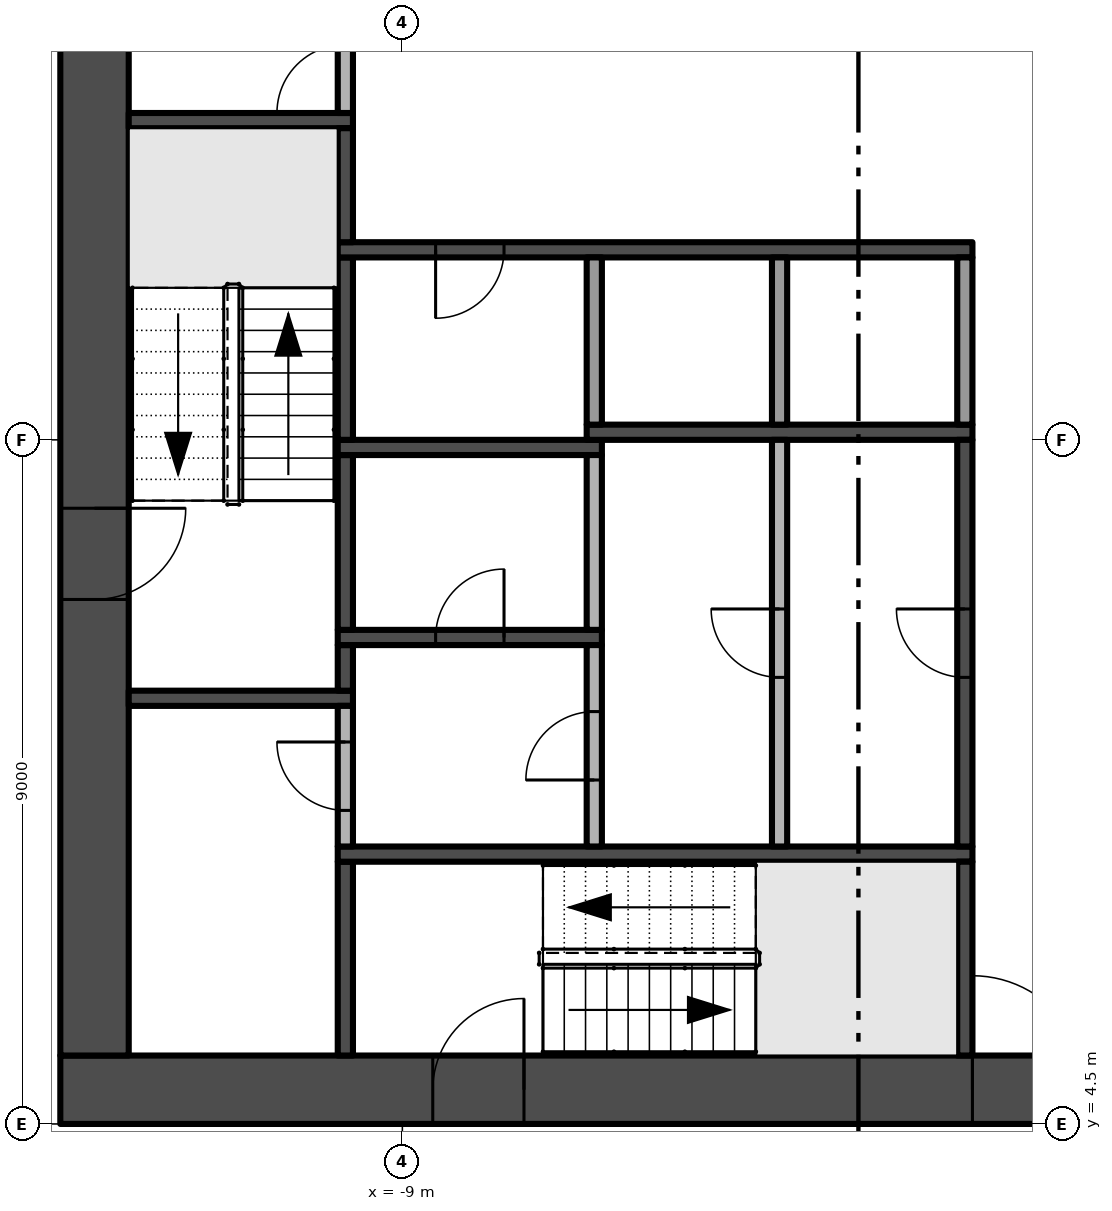
"""IFC4 building model, lengths in metres.
Left out: names, types, materials, properties, quantities, classifications, styles, units other than length and angle.
Written with IfcOpenShell. Run it as: python <this file> out.ifc"""

import sys

from ifc_helpers import new_model, si_unit, direction, frame, frame_2d, origin, place, context, subcontext, project, spatial, rectangle, extrude, element, fill, save


model = new_model("IFC4")
c1 = context("Model", 3, precision=1e-05, world=origin(), true_north=direction((0.0, 1.0)))
c2 = subcontext(c1, "Body", "Model", "MODEL_VIEW")
j1 = project(units=[si_unit("LENGTHUNIT", "METRE"), si_unit("PLANEANGLEUNIT", "RADIAN")], contexts=[c1])
p1 = place(None, origin())
s1 = spatial("IfcSite", under=j1, at=p1, CompositionType="ELEMENT")
p2 = place(p1, origin())
s2 = spatial("IfcBuilding", under=s1, at=p2, CompositionType="ELEMENT")
p3 = place(p2, frame((0.0, 0.0, 37.8)))
s3 = spatial("IfcBuildingStorey", under=s2, at=p3, CompositionType="ELEMENT", Elevation=37.8)
p4 = place(p3, frame((-13.5, 4.95, -0.3), z_axis=(0.0, 0.0, 1.0), x_axis=(1.0, 0.0, 0.0)))
e1 = element("IfcWall", 1, at=p4, inside=s3, PredefinedType="SHEAR", context=c2, shape_type="SweptSolid", body=[
    extrude(rectangle(XDim=27.0, YDim=0.9, at=frame_2d((13.5, 0.0))), origin(), (0.0, 0.0, 1.0), 3.8),
])
p5 = place(p4, frame((12.0, 0.0, 0.3)))
e2 = element("IfcOpeningElement", 2, at=p5, cuts=e1, PredefinedType="OPENING", context=c2, shape_type="SweptSolid", body=[
    extrude(rectangle(XDim=3.0, YDim=2.4, at=frame_2d((1.5, 1.2))), frame((0.0, 0.46, 0.0), z_axis=(0.0, -1.0, 0.0), x_axis=(1.0, 0.0, 0.0)), (0.0, 0.0, 1.0), 0.92),
])
p6 = place(p4, frame((4.9, 0.0, 0.3)))
e3 = element("IfcOpeningElement", 3, at=p6, cuts=e1, PredefinedType="OPENING", context=c2, shape_type="SweptSolid", body=[
    extrude(rectangle(XDim=1.2, YDim=2.2, at=frame_2d((0.6, 1.1))), frame((0.0, 0.46, 0.0), z_axis=(0.0, -1.0, 0.0), x_axis=(1.0, 0.0, 0.0)), (0.0, 0.0, 1.0), 0.92),
])
p7 = place(p4, frame((20.75, 0.0, 0.3)))
e4 = element("IfcOpeningElement", 4, at=p7, cuts=e1, PredefinedType="OPENING", context=c2, shape_type="SweptSolid", body=[
    extrude(rectangle(XDim=1.5, YDim=2.2, at=frame_2d((0.75, 1.1))), frame((0.0, 0.46, 0.0), z_axis=(0.0, -1.0, 0.0), x_axis=(1.0, 0.0, 0.0)), (0.0, 0.0, 1.0), 0.92),
])
p8 = place(p4, frame((17.4, 0.0, 0.3)))
e5 = element("IfcOpeningElement", 5, at=p8, cuts=e1, PredefinedType="OPENING", context=c2, shape_type="SweptSolid", body=[
    extrude(rectangle(XDim=1.2, YDim=2.2, at=frame_2d((0.6, 1.1))), frame((0.0, 0.46, 0.0), z_axis=(0.0, -1.0, 0.0), x_axis=(1.0, 0.0, 0.0)), (0.0, 0.0, 1.0), 0.92),
])
p9 = place(p3, frame((-13.05, 21.6, -0.3), z_axis=(0.0, 0.0, 1.0), x_axis=(0.0, -1.0, 0.0)))
e6 = element("IfcWall", 6, at=p9, inside=s3, PredefinedType="SHEAR", context=c2, shape_type="SweptSolid", body=[
    extrude(rectangle(XDim=16.2, YDim=0.9, at=frame_2d((8.1, 0.0))), origin(), (0.0, 0.0, 1.0), 3.8),
])
p10 = place(p9, frame((9.0, 0.0, 0.3)))
e7 = element("IfcOpeningElement", 7, at=p10, cuts=e6, PredefinedType="OPENING", context=c2, shape_type="SweptSolid", body=[
    extrude(rectangle(XDim=1.2, YDim=2.2, at=frame_2d((0.6, 1.1))), frame((0.0, 0.46, 0.0), z_axis=(0.0, -1.0, 0.0), x_axis=(1.0, 0.0, 0.0)), (0.0, 0.0, 1.0), 0.92),
])
for number, where, z_axis, x_axis in (
    (8, (-12.6, 10.1, 0.0), (0.0, 0.0, 1.0), (1.0, 0.0, 0.0)),
    (9, (-12.6, 17.7, 0.0), (0.0, 0.0, 1.0), (1.0, 0.0, 0.0)),
):
    element("IfcWall", number, at=place(p3, frame(where, z_axis=z_axis, x_axis=x_axis)), inside=s3, PredefinedType="SHEAR", context=c2, shape_type="SweptSolid", body=[
        extrude(rectangle(XDim=2.95, YDim=0.2, at=frame_2d((1.475, 0.0))), origin(), (0.0, 0.0, 1.0), 3.5),
    ])
p11 = place(p3, frame((-9.75, 5.4, 0.0), z_axis=(0.0, 0.0, 1.0), x_axis=(0.0, 1.0, 0.0)))
e10 = element("IfcWall", 10, at=p11, inside=s3, PredefinedType="SHEAR", context=c2, shape_type="SweptSolid", body=[
    extrude(rectangle(XDim=2.55, YDim=0.2, at=frame_2d((1.275, 0.0))), origin(), (0.0, 0.0, 1.0), 3.5),
])
p12 = place(p3, frame((-9.85, 8.05, 0.0), z_axis=(0.0, 0.0, 1.0), x_axis=(1.0, 0.0, 0.0)))
e11 = element("IfcWall", 11, at=p12, inside=s3, PredefinedType="SHEAR", context=c2, shape_type="SweptSolid", body=[
    extrude(rectangle(XDim=8.35, YDim=0.2, at=frame_2d((4.175, 0.0))), origin(), (0.0, 0.0, 1.0), 3.5),
])
p13 = place(p3, frame((-9.75, 8.15, 0.0), z_axis=(0.0, 0.0, 1.0), x_axis=(0.0, 1.0, 0.0)))
e12 = element("IfcWall", 12, at=p13, inside=s3, PredefinedType="PARTITIONING", context=c2, shape_type="SweptSolid", body=[
    extrude(rectangle(XDim=1.85, YDim=0.2, at=frame_2d((0.925, 0.0))), origin(), (0.0, 0.0, 1.0), 3.5),
])
p14 = place(p13, frame((0.475, 0.0, 0.0)))
e13 = element("IfcOpeningElement", 13, at=p14, cuts=e12, PredefinedType="OPENING", context=c2, shape_type="SweptSolid", body=[
    extrude(rectangle(XDim=0.9, YDim=2.1, at=frame_2d((0.45, 1.05))), frame((0.0, 0.11, 0.0), z_axis=(0.0, -1.0, 0.0), x_axis=(1.0, 0.0, 0.0)), (0.0, 0.0, 1.0), 0.22),
])
p15 = place(p3, frame((-9.75, 10.2, 0.0), z_axis=(0.0, 0.0, 1.0), x_axis=(0.0, 1.0, 0.0)))
e14 = element("IfcWall", 14, at=p15, inside=s3, PredefinedType="SHEAR", context=c2, shape_type="SweptSolid", body=[
    extrude(rectangle(XDim=0.6, YDim=0.2, at=frame_2d((0.3, 0.0))), origin(), (0.0, 0.0, 1.0), 3.5),
])
p16 = place(p3, frame((-9.85, 10.9, 0.0), z_axis=(0.0, 0.0, 1.0), x_axis=(1.0, 0.0, 0.0)))
e15 = element("IfcWall", 15, at=p16, inside=s3, PredefinedType="SHEAR", context=c2, shape_type="SweptSolid", body=[
    extrude(rectangle(XDim=3.475, YDim=0.2, at=frame_2d((1.738, 0.0))), origin(), (0.0, 0.0, 1.0), 3.5),
])
p17 = place(p16, frame((1.288, 0.0, 0.0)))
e16 = element("IfcOpeningElement", 16, at=p17, cuts=e15, PredefinedType="OPENING", context=c2, shape_type="SweptSolid", body=[
    extrude(rectangle(XDim=0.9, YDim=2.1, at=frame_2d((0.45, 1.05))), frame((0.0, 0.11, 0.0), z_axis=(0.0, -1.0, 0.0), x_axis=(1.0, 0.0, 0.0)), (0.0, 0.0, 1.0), 0.22),
])
p18 = place(p3, frame((-9.75, 11.0, 0.0), z_axis=(0.0, 0.0, 1.0), x_axis=(0.0, 1.0, 0.0)))
e17 = element("IfcWall", 17, at=p18, inside=s3, PredefinedType="SHEAR", context=c2, shape_type="SweptSolid", body=[
    extrude(rectangle(XDim=2.3, YDim=0.2, at=frame_2d((1.15, 0.0))), origin(), (0.0, 0.0, 1.0), 3.5),
])
p19 = place(p3, frame((-9.85, 13.4, 0.0), z_axis=(0.0, 0.0, 1.0), x_axis=(1.0, 0.0, 0.0)))
e18 = element("IfcWall", 18, at=p19, inside=s3, PredefinedType="SHEAR", context=c2, shape_type="SweptSolid", body=[
    extrude(rectangle(XDim=3.475, YDim=0.2, at=frame_2d((1.738, 0.0))), origin(), (0.0, 0.0, 1.0), 3.5),
])
p20 = place(p3, frame((-9.75, 13.5, 0.0), z_axis=(0.0, 0.0, 1.0), x_axis=(0.0, 1.0, 0.0)))
e19 = element("IfcWall", 19, at=p20, inside=s3, PredefinedType="SHEAR", context=c2, shape_type="SweptSolid", body=[
    extrude(rectangle(XDim=2.4, YDim=0.2, at=frame_2d((1.2, 0.0))), origin(), (0.0, 0.0, 1.0), 3.5),
])
p21 = place(p3, frame((-1.5, 16.0, 0.0), z_axis=(0.0, 0.0, 1.0), x_axis=(-1.0, 0.0, 0.0)))
e20 = element("IfcWall", 20, at=p21, inside=s3, PredefinedType="SHEAR", context=c2, shape_type="SweptSolid", body=[
    extrude(rectangle(XDim=8.35, YDim=0.2, at=frame_2d((4.175, 0.0))), origin(), (0.0, 0.0, 1.0), 3.5),
])
p22 = place(p21, frame((6.162, 0.0, 0.0)))
e21 = element("IfcOpeningElement", 21, at=p22, cuts=e20, PredefinedType="OPENING", context=c2, shape_type="SweptSolid", body=[
    extrude(rectangle(XDim=0.9, YDim=2.1, at=frame_2d((0.45, 1.05))), frame((0.0, 0.11, 0.0), z_axis=(0.0, -1.0, 0.0), x_axis=(1.0, 0.0, 0.0)), (0.0, 0.0, 1.0), 0.22),
])
p23 = place(p3, frame((-9.75, 16.1, 0.0), z_axis=(0.0, 0.0, 1.0), x_axis=(0.0, 1.0, 0.0)))
e22 = element("IfcWall", 22, at=p23, inside=s3, PredefinedType="SHEAR", context=c2, shape_type="SweptSolid", body=[
    extrude(rectangle(XDim=1.5, YDim=0.2, at=frame_2d((0.75, 0.0))), origin(), (0.0, 0.0, 1.0), 3.5),
])
p24 = place(p3, frame((-9.75, 17.8, 0.0), z_axis=(0.0, 0.0, 1.0), x_axis=(0.0, 1.0, 0.0)))
e23 = element("IfcWall", 23, at=p24, inside=s3, PredefinedType="PARTITIONING", context=c2, shape_type="SweptSolid", body=[
    extrude(rectangle(XDim=1.4, YDim=0.2, at=frame_2d((0.7, 0.0))), origin(), (0.0, 0.0, 1.0), 3.5),
])
p25 = place(p24, origin())
e24 = element("IfcOpeningElement", 24, at=p25, cuts=e23, PredefinedType="OPENING", context=c2, shape_type="SweptSolid", body=[
    extrude(rectangle(XDim=0.9, YDim=2.1, at=frame_2d((0.45, 1.05))), frame((0.0, 0.11, 0.0), z_axis=(0.0, -1.0, 0.0), x_axis=(1.0, 0.0, 0.0)), (0.0, 0.0, 1.0), 0.22),
])
p26 = place(p3, frame((-6.475, 8.15, 0.0), z_axis=(0.0, 0.0, 1.0), x_axis=(0.0, 1.0, 0.0)))
e25 = element("IfcWall", 25, at=p26, inside=s3, PredefinedType="PARTITIONING", context=c2, shape_type="SweptSolid", body=[
    extrude(rectangle(XDim=2.65, YDim=0.2, at=frame_2d((1.325, 0.0))), origin(), (0.0, 0.0, 1.0), 3.5),
])
p27 = place(p26, frame((0.875, 0.0, 0.0)))
e26 = element("IfcOpeningElement", 26, at=p27, cuts=e25, PredefinedType="OPENING", context=c2, shape_type="SweptSolid", body=[
    extrude(rectangle(XDim=0.9, YDim=2.1, at=frame_2d((0.45, 1.05))), frame((0.0, 0.11, 0.0), z_axis=(0.0, -1.0, 0.0), x_axis=(1.0, 0.0, 0.0)), (0.0, 0.0, 1.0), 0.22),
])
p28 = place(p3, frame((-6.475, 11.0, 0.0), z_axis=(0.0, 0.0, 1.0), x_axis=(0.0, 1.0, 0.0)))
e27 = element("IfcWall", 27, at=p28, inside=s3, PredefinedType="PARTITIONING", context=c2, shape_type="SweptSolid", body=[
    extrude(rectangle(XDim=2.3, YDim=0.2, at=frame_2d((1.15, 0.0))), origin(), (0.0, 0.0, 1.0), 3.5),
])
p29 = place(p3, frame((-6.575, 13.6, 0.0), z_axis=(0.0, 0.0, 1.0), x_axis=(1.0, 0.0, 0.0)))
e28 = element("IfcWall", 28, at=p29, inside=s3, PredefinedType="SHEAR", context=c2, shape_type="SweptSolid", body=[
    extrude(rectangle(XDim=5.075, YDim=0.2, at=frame_2d((2.538, 0.0))), origin(), (0.0, 0.0, 1.0), 3.5),
])
p30 = place(p3, frame((-6.475, 13.7, 0.0), z_axis=(0.0, 0.0, 1.0), x_axis=(0.0, 1.0, 0.0)))
e29 = element("IfcWall", 29, at=p30, inside=s3, PredefinedType="PARTITIONING", context=c2, shape_type="SweptSolid", body=[
    extrude(rectangle(XDim=2.2, YDim=0.2, at=frame_2d((1.1, 0.0))), origin(), (0.0, 0.0, 1.0), 3.5),
])
p31 = place(p3, frame((-4.037, 8.15, 0.0), z_axis=(0.0, 0.0, 1.0), x_axis=(0.0, 1.0, 0.0)))
e30 = element("IfcWall", 30, at=p31, inside=s3, PredefinedType="PARTITIONING", context=c2, shape_type="SweptSolid", body=[
    extrude(rectangle(XDim=5.35, YDim=0.2, at=frame_2d((2.675, 0.0))), origin(), (0.0, 0.0, 1.0), 3.5),
])
p32 = place(p31, frame((2.225, 0.0, 0.0)))
e31 = element("IfcOpeningElement", 31, at=p32, cuts=e30, PredefinedType="OPENING", context=c2, shape_type="SweptSolid", body=[
    extrude(rectangle(XDim=0.9, YDim=2.1, at=frame_2d((0.45, 1.05))), frame((0.0, 0.11, 0.0), z_axis=(0.0, -1.0, 0.0), x_axis=(1.0, 0.0, 0.0)), (0.0, 0.0, 1.0), 0.22),
])
p33 = place(p3, frame((-4.037, 13.7, 0.0), z_axis=(0.0, 0.0, 1.0), x_axis=(0.0, 1.0, 0.0)))
e32 = element("IfcWall", 32, at=p33, inside=s3, PredefinedType="PARTITIONING", context=c2, shape_type="SweptSolid", body=[
    extrude(rectangle(XDim=2.2, YDim=0.2, at=frame_2d((1.1, 0.0))), origin(), (0.0, 0.0, 1.0), 3.5),
])
p34 = place(p3, frame((-1.6, 5.4, 0.0), z_axis=(0.0, 0.0, 1.0), x_axis=(0.0, 1.0, 0.0)))
e33 = element("IfcWall", 33, at=p34, inside=s3, PredefinedType="SHEAR", context=c2, shape_type="SweptSolid", body=[
    extrude(rectangle(XDim=2.55, YDim=0.2, at=frame_2d((1.275, 0.0))), origin(), (0.0, 0.0, 1.0), 3.5),
])
p35 = place(p3, frame((-1.6, 8.15, 0.0), z_axis=(0.0, 0.0, 1.0), x_axis=(0.0, 1.0, 0.0)))
e34 = element("IfcWall", 34, at=p35, inside=s3, PredefinedType="SHEAR", context=c2, shape_type="SweptSolid", body=[
    extrude(rectangle(XDim=5.35, YDim=0.2, at=frame_2d((2.675, 0.0))), origin(), (0.0, 0.0, 1.0), 3.5),
])
p36 = place(p35, frame((2.225, 0.0, 0.0)))
e35 = element("IfcOpeningElement", 35, at=p36, cuts=e34, PredefinedType="OPENING", context=c2, shape_type="SweptSolid", body=[
    extrude(rectangle(XDim=0.9, YDim=2.1, at=frame_2d((0.45, 1.05))), frame((0.0, 0.11, 0.0), z_axis=(0.0, -1.0, 0.0), x_axis=(1.0, 0.0, 0.0)), (0.0, 0.0, 1.0), 0.22),
])
p37 = place(p3, frame((-1.6, 13.7, 0.0), z_axis=(0.0, 0.0, 1.0), x_axis=(0.0, 1.0, 0.0)))
e36 = element("IfcWall", 36, at=p37, inside=s3, PredefinedType="PARTITIONING", context=c2, shape_type="SweptSolid", body=[
    extrude(rectangle(XDim=2.2, YDim=0.2, at=frame_2d((1.1, 0.0))), origin(), (0.0, 0.0, 1.0), 3.5),
])
p38 = place(p5, frame((3.0, 0.0, 0.0), z_axis=(0.0, 0.0, 1.0), x_axis=(-1.0, 0.0, 0.0)))
e37 = element("IfcDoor", 37, at=p38, inside=s3, OperationType="DOUBLE_DOOR_SINGLE_SWING", PredefinedType="DOOR", context=c2, shape_type="SweptSolid", body=[
    extrude(rectangle(XDim=3.0, YDim=2.4, at=frame_2d((1.5, 1.2))), frame((0.0, 0.025, 0.0), z_axis=(0.0, -1.0, 0.0), x_axis=(1.0, 0.0, 0.0)), (0.0, 0.0, 1.0), 0.05),
])
fill(e2, e37)
p39 = place(p10, frame((1.2, 0.0, 0.0), z_axis=(0.0, 0.0, 1.0), x_axis=(-1.0, 0.0, 0.0)))
e38 = element("IfcDoor", 38, at=p39, inside=s3, OperationType="SINGLE_SWING_RIGHT", PredefinedType="DOOR", context=c2, shape_type="SweptSolid", body=[
    extrude(rectangle(XDim=1.2, YDim=2.2, at=frame_2d((0.6, 1.1))), frame((0.0, 0.025, 0.0), z_axis=(0.0, -1.0, 0.0), x_axis=(1.0, 0.0, 0.0)), (0.0, 0.0, 1.0), 0.05),
])
fill(e7, e38)
p40 = place(p6, frame((1.2, 0.0, 0.0), z_axis=(0.0, 0.0, 1.0), x_axis=(-1.0, 0.0, 0.0)))
e39 = element("IfcDoor", 39, at=p40, inside=s3, OperationType="SINGLE_SWING_LEFT", PredefinedType="DOOR", context=c2, shape_type="SweptSolid", body=[
    extrude(rectangle(XDim=1.2, YDim=2.2, at=frame_2d((0.6, 1.1))), frame((0.0, 0.025, 0.0), z_axis=(0.0, -1.0, 0.0), x_axis=(1.0, 0.0, 0.0)), (0.0, 0.0, 1.0), 0.05),
])
fill(e3, e39)
p41 = place(p22, origin())
e40 = element("IfcDoor", 40, at=p41, inside=s3, OperationType="SINGLE_SWING_RIGHT", PredefinedType="DOOR", context=c2, shape_type="SweptSolid", body=[
    extrude(rectangle(XDim=0.9, YDim=2.1, at=frame_2d((0.45, 1.05))), frame((0.0, 0.025, 0.0), z_axis=(0.0, -1.0, 0.0), x_axis=(1.0, 0.0, 0.0)), (0.0, 0.0, 1.0), 0.05),
])
fill(e21, e40)
p42 = place(p36, origin())
e41 = element("IfcDoor", 41, at=p42, inside=s3, OperationType="SINGLE_SWING_RIGHT", PredefinedType="DOOR", context=c2, shape_type="SweptSolid", body=[
    extrude(rectangle(XDim=0.9, YDim=2.1, at=frame_2d((0.45, 1.05))), frame((0.0, 0.025, 0.0), z_axis=(0.0, -1.0, 0.0), x_axis=(1.0, 0.0, 0.0)), (0.0, 0.0, 1.0), 0.05),
])
fill(e35, e41)
p43 = place(p25, origin())
e42 = element("IfcDoor", 42, at=p43, inside=s3, OperationType="SINGLE_SWING_LEFT", PredefinedType="DOOR", context=c2, shape_type="SweptSolid", body=[
    extrude(rectangle(XDim=0.9, YDim=2.1, at=frame_2d((0.45, 1.05))), frame((0.0, 0.025, 0.0), z_axis=(0.0, -1.0, 0.0), x_axis=(1.0, 0.0, 0.0)), (0.0, 0.0, 1.0), 0.05),
])
fill(e24, e42)
p44 = place(p32, origin())
e43 = element("IfcDoor", 43, at=p44, inside=s3, OperationType="SINGLE_SWING_RIGHT", PredefinedType="DOOR", context=c2, shape_type="SweptSolid", body=[
    extrude(rectangle(XDim=0.9, YDim=2.1, at=frame_2d((0.45, 1.05))), frame((0.0, 0.025, 0.0), z_axis=(0.0, -1.0, 0.0), x_axis=(1.0, 0.0, 0.0)), (0.0, 0.0, 1.0), 0.05),
])
fill(e31, e43)
p45 = place(p27, origin())
e44 = element("IfcDoor", 44, at=p45, inside=s3, OperationType="SINGLE_SWING_LEFT", PredefinedType="DOOR", context=c2, shape_type="SweptSolid", body=[
    extrude(rectangle(XDim=0.9, YDim=2.1, at=frame_2d((0.45, 1.05))), frame((0.0, 0.025, 0.0), z_axis=(0.0, -1.0, 0.0), x_axis=(1.0, 0.0, 0.0)), (0.0, 0.0, 1.0), 0.05),
])
fill(e26, e44)
p46 = place(p17, origin())
e45 = element("IfcDoor", 45, at=p46, inside=s3, OperationType="SINGLE_SWING_RIGHT", PredefinedType="DOOR", context=c2, shape_type="SweptSolid", body=[
    extrude(rectangle(XDim=0.9, YDim=2.1, at=frame_2d((0.45, 1.05))), frame((0.0, 0.025, 0.0), z_axis=(0.0, -1.0, 0.0), x_axis=(1.0, 0.0, 0.0)), (0.0, 0.0, 1.0), 0.05),
])
fill(e16, e45)
p47 = place(p14, origin())
e46 = element("IfcDoor", 46, at=p47, inside=s3, OperationType="SINGLE_SWING_RIGHT", PredefinedType="DOOR", context=c2, shape_type="SweptSolid", body=[
    extrude(rectangle(XDim=0.9, YDim=2.1, at=frame_2d((0.45, 1.05))), frame((0.0, 0.025, 0.0), z_axis=(0.0, -1.0, 0.0), x_axis=(1.0, 0.0, 0.0)), (0.0, 0.0, 1.0), 0.05),
])
fill(e13, e46)
save(model, sys.argv[1])
